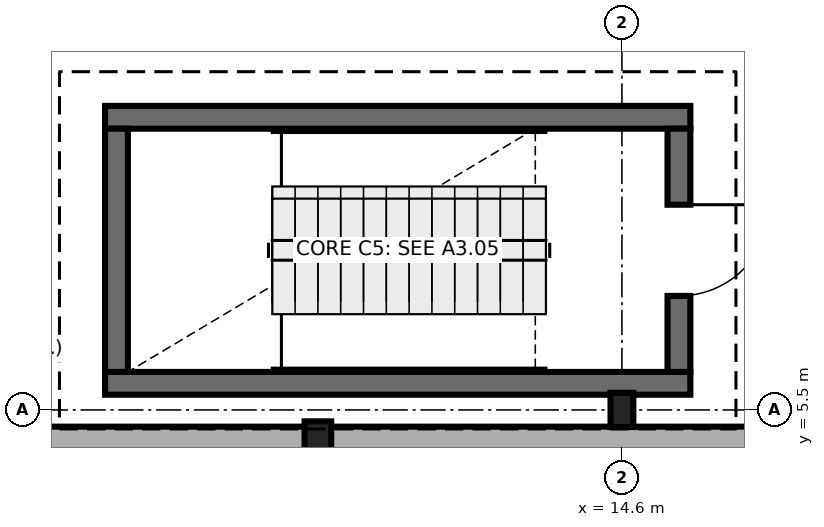
"""IFC4 building model, lengths in metres.
Left out: names, types, materials, properties, quantities, classifications, styles, units other than length and angle.
Written with IfcOpenShell. Run it as: python <this file> out.ifc"""

import sys

from ifc_helpers import new_model, si_unit, direction, frame, frame_2d, origin, origin_2d, place, context, subcontext, project, spatial, rectangle, i_section, extrude, element, fill, save


model = new_model("IFC4")
c1 = context("Model", 3, precision=1e-05, world=origin(), true_north=direction((0.0, 1.0)))
c2 = subcontext(c1, "Body", "Model", "MODEL_VIEW")
j1 = project(units=[si_unit("LENGTHUNIT", "METRE"), si_unit("PLANEANGLEUNIT", "RADIAN")], contexts=[c1])
p1 = place(None, origin())
s1 = spatial("IfcSite", under=j1, at=p1, CompositionType="ELEMENT")
p2 = place(p1, origin())
s2 = spatial("IfcBuilding", under=s1, at=p2, CompositionType="ELEMENT")
p3 = place(p2, origin())
s3 = spatial("IfcBuildingStorey", under=s2, at=p3, CompositionType="ELEMENT", Elevation=0.0)
p4 = place(p3, frame((10.6, 5.05, 0.0), z_axis=(0.0, 0.0, 1.0), x_axis=(1.0, 0.0, 0.0)))
e1 = element("IfcColumn", 1, at=p4, inside=s3, PredefinedType="PILASTER", context=c2, shape_type="SweptSolid", body=[
    extrude(rectangle(XDim=0.35, YDim=0.6, at=origin_2d()), origin(), (0.0, 0.0, 1.0), 4.8),
])
p5 = place(p3, frame((14.6, 5.5, 0.0), z_axis=(0.0, 0.0, 1.0), x_axis=(1.0, 0.0, 0.0)))
e2 = element("IfcColumn", 2, at=p5, inside=s3, PredefinedType="COLUMN", context=c2, shape_type="SweptSolid", body=[
    extrude(i_section(OverallWidth=0.3, OverallDepth=0.45, WebThickness=0.014, FlangeThickness=0.026, FilletRadius=0.027, at=origin_2d()), origin(), (0.0, 0.0, 1.0), 4.8),
])
for number, where, z_axis, x_axis in (
    (3, (7.8, 5.85, 0.0), (0.0, 0.0, 1.0), (1.0, 0.0, 0.0)),
    (4, (15.5, 9.35, 0.0), (0.0, 0.0, 1.0), (-1.0, 0.0, 0.0)),
):
    element("IfcWall", number, at=place(p3, frame(where, z_axis=z_axis, x_axis=x_axis)), inside=s3, PredefinedType="SHEAR", context=c2, shape_type="SweptSolid", body=[
        extrude(rectangle(XDim=7.7, YDim=0.3, at=frame_2d((3.85, 0.0))), origin(), (0.0, 0.0, 1.0), 4.8),
    ])
p6 = place(p3, frame((7.95, 9.2, 0.0), z_axis=(0.0, 0.0, 1.0), x_axis=(0.0, -1.0, 0.0)))
e5 = element("IfcWall", 5, at=p6, inside=s3, PredefinedType="SHEAR", context=c2, shape_type="SweptSolid", body=[
    extrude(rectangle(XDim=3.2, YDim=0.3, at=frame_2d((1.6, 0.0))), origin(), (0.0, 0.0, 1.0), 4.8),
])
p7 = place(p3, frame((15.35, 6.0, 0.0), z_axis=(0.0, 0.0, 1.0), x_axis=(0.0, 1.0, 0.0)))
e6 = element("IfcWall", 6, at=p7, inside=s3, PredefinedType="SHEAR", context=c2, shape_type="SweptSolid", body=[
    extrude(rectangle(XDim=3.2, YDim=0.3, at=frame_2d((1.6, 0.0))), origin(), (0.0, 0.0, 1.0), 4.8),
])
p8 = place(p7, frame((1.0, 0.0, 0.0)))
e7 = element("IfcOpeningElement", 7, at=p8, cuts=e6, PredefinedType="OPENING", context=c2, shape_type="SweptSolid", body=[
    extrude(rectangle(XDim=1.2, YDim=2.15, at=frame_2d((0.6, 1.075))), frame((0.0, 0.16, 0.0), z_axis=(0.0, -1.0, 0.0), x_axis=(1.0, 0.0, 0.0)), (0.0, 0.0, 1.0), 0.32),
])
p9 = place(p3, frame((5.962, 5.09, 0.0), z_axis=(0.0, 0.0, 1.0), x_axis=(1.0, 0.0, 0.0)))
e8 = element("IfcWall", 8, at=p9, inside=s3, PredefinedType="SOLIDWALL", context=c2, shape_type="SweptSolid", body=[
    extrude(rectangle(XDim=48.176, YDim=0.38, at=frame_2d((24.088, 0.0))), origin(), (0.0, 0.0, 1.0), 4.55),
])
p10 = place(p9, frame((10.614, 0.0, 0.9)))
e9 = element("IfcOpeningElement", 9, at=p10, cuts=e8, PredefinedType="OPENING", context=c2, shape_type="SweptSolid", body=[
    extrude(rectangle(XDim=1.2, YDim=1.8, at=frame_2d((0.6, 0.9))), frame((0.0, 0.2, 0.0), z_axis=(0.0, -1.0, 0.0), x_axis=(1.0, 0.0, 0.0)), (0.0, 0.0, 1.0), 0.4),
])
p11 = place(p9, frame((13.458, 0.0, 0.9)))
e10 = element("IfcOpeningElement", 10, at=p11, cuts=e8, PredefinedType="OPENING", context=c2, shape_type="SweptSolid", body=[
    extrude(rectangle(XDim=1.2, YDim=1.8, at=frame_2d((0.6, 0.9))), frame((0.0, 0.2, 0.0), z_axis=(0.0, -1.0, 0.0), x_axis=(1.0, 0.0, 0.0)), (0.0, 0.0, 1.0), 0.4),
])
p12 = place(p9, frame((29.438, 0.0, 0.9)))
e11 = element("IfcOpeningElement", 11, at=p12, cuts=e8, PredefinedType="OPENING", context=c2, shape_type="SweptSolid", body=[
    extrude(rectangle(XDim=2.4, YDim=1.8, at=frame_2d((1.2, 0.9))), frame((0.0, 0.2, 0.0), z_axis=(0.0, -1.0, 0.0), x_axis=(1.0, 0.0, 0.0)), (0.0, 0.0, 1.0), 0.4),
])
p13 = place(p9, frame((33.738, 0.0, 0.9)))
e12 = element("IfcOpeningElement", 12, at=p13, cuts=e8, PredefinedType="OPENING", context=c2, shape_type="SweptSolid", body=[
    extrude(rectangle(XDim=1.8, YDim=2.1, at=frame_2d((0.9, 1.05))), frame((0.0, 0.2, 0.0), z_axis=(0.0, -1.0, 0.0), x_axis=(1.0, 0.0, 0.0)), (0.0, 0.0, 1.0), 0.4),
])
p14 = place(p9, frame((37.258, 0.0, 0.9)))
e13 = element("IfcOpeningElement", 13, at=p14, cuts=e8, PredefinedType="OPENING", context=c2, shape_type="SweptSolid", body=[
    extrude(rectangle(XDim=0.9, YDim=1.8, at=frame_2d((0.45, 0.9))), frame((0.0, 0.2, 0.0), z_axis=(0.0, -1.0, 0.0), x_axis=(1.0, 0.0, 0.0)), (0.0, 0.0, 1.0), 0.4),
])
p15 = place(p9, frame((39.018, 0.0, 0.9)))
e14 = element("IfcOpeningElement", 14, at=p15, cuts=e8, PredefinedType="OPENING", context=c2, shape_type="SweptSolid", body=[
    extrude(rectangle(XDim=0.9, YDim=1.8, at=frame_2d((0.45, 0.9))), frame((0.0, 0.2, 0.0), z_axis=(0.0, -1.0, 0.0), x_axis=(1.0, 0.0, 0.0)), (0.0, 0.0, 1.0), 0.4),
])
p16 = place(p9, frame((41.538, 0.0, 0.9)))
e15 = element("IfcOpeningElement", 15, at=p16, cuts=e8, PredefinedType="OPENING", context=c2, shape_type="SweptSolid", body=[
    extrude(rectangle(XDim=1.2, YDim=1.8, at=frame_2d((0.6, 0.9))), frame((0.0, 0.2, 0.0), z_axis=(0.0, -1.0, 0.0), x_axis=(1.0, 0.0, 0.0)), (0.0, 0.0, 1.0), 0.4),
])
p17 = place(p9, frame((44.538, 0.0, 0.9)))
e16 = element("IfcOpeningElement", 16, at=p17, cuts=e8, PredefinedType="OPENING", context=c2, shape_type="SweptSolid", body=[
    extrude(rectangle(XDim=1.2, YDim=1.5, at=frame_2d((0.6, 0.75))), frame((0.0, 0.2, 0.0), z_axis=(0.0, -1.0, 0.0), x_axis=(1.0, 0.0, 0.0)), (0.0, 0.0, 1.0), 0.4),
])
p18 = place(p8, frame((1.2, 0.0, 0.0), z_axis=(0.0, 0.0, 1.0), x_axis=(-1.0, 0.0, 0.0)))
e17 = element("IfcDoor", 17, at=p18, inside=s3, OperationType="SINGLE_SWING_RIGHT", PredefinedType="DOOR", context=c2, shape_type="SweptSolid", body=[
    extrude(rectangle(XDim=1.2, YDim=2.15, at=frame_2d((0.6, 1.075))), frame((0.0, 0.025, 0.0), z_axis=(0.0, -1.0, 0.0), x_axis=(1.0, 0.0, 0.0)), (0.0, 0.0, 1.0), 0.05),
])
fill(e7, e17)
save(model, sys.argv[1])
